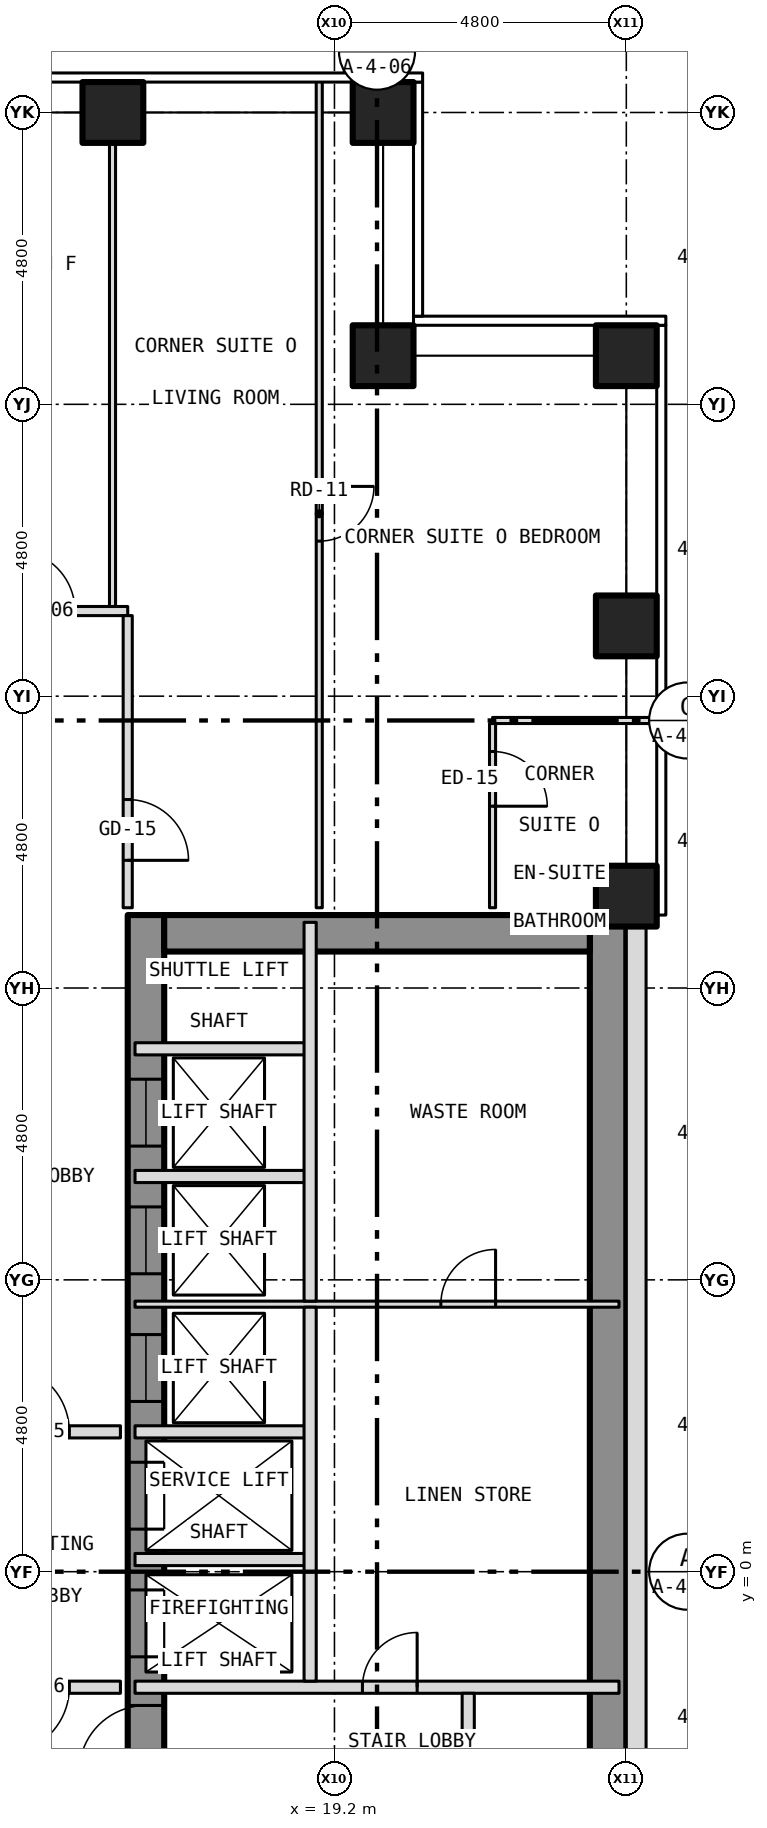
"""IFC4 building model, lengths in metres.
Left out: names, types, materials, properties, quantities, classifications, styles, units other than length and angle.
Written with IfcOpenShell. Run it as: python <this file> out.ifc"""

import sys

from ifc_helpers import new_model, si_unit, direction, frame, frame_2d, origin, origin_2d, place, context, subcontext, project, spatial, rectangle, hollow_rectangle, extrude, element, fill, save


model = new_model("IFC4")
c1 = context("Model", 3, precision=1e-05, world=origin(), true_north=direction((0.0, 1.0)))
c2 = subcontext(c1, "Body", "Model", "MODEL_VIEW")
j1 = project(units=[si_unit("LENGTHUNIT", "METRE"), si_unit("PLANEANGLEUNIT", "RADIAN")], contexts=[c1])
p1 = place(None, origin())
s1 = spatial("IfcSite", under=j1, at=p1, CompositionType="ELEMENT")
p2 = place(p1, origin())
s2 = spatial("IfcBuilding", under=s1, at=p2, CompositionType="ELEMENT")
p3 = place(p2, frame((0.0, 0.0, 49.5)))
s3 = spatial("IfcBuildingStorey", under=s2, at=p3, CompositionType="ELEMENT", Elevation=49.5)
for number, where, z_axis, x_axis in (
    (1, (15.556, 24.0, -0.15), (0.0, 0.0, 1.0), (1.0, 0.0, 0.0)),
    (2, (20.0, 24.0, -0.15), (0.0, 0.0, 1.0), (1.0, 0.0, 0.0)),
    (3, (24.0, 11.111, -0.15), (0.0, 0.0, 1.0), (1.0, 0.0, 0.0)),
    (4, (24.0, 15.556, -0.15), (0.0, 0.0, 1.0), (1.0, 0.0, 0.0)),
    (5, (24.0, 20.0, -0.15), (0.0, 0.0, 1.0), (1.0, 0.0, 0.0)),
    (6, (20.0, 20.0, -0.15), (0.0, 0.0, 1.0), (1.0, 0.0, 0.0)),
):
    element("IfcColumn", number, at=place(p3, frame(where, z_axis=z_axis, x_axis=x_axis)), inside=s3, PredefinedType="COLUMN", context=c2, shape_type="SweptSolid", body=[
        extrude(hollow_rectangle(XDim=1.0, YDim=1.0, WallThickness=0.06, at=origin_2d()), origin(), (0.0, 0.0, 1.0), 3.5),
    ])
p4 = place(p3, frame((16.1, -10.8, 0.0), z_axis=(0.0, 0.0, 1.0), x_axis=(0.0, 1.0, 0.0)))
e7 = element("IfcWall", 7, at=p4, inside=s3, PredefinedType="SHEAR", context=c2, shape_type="SweptSolid", body=[
    extrude(rectangle(XDim=21.6, YDim=0.6, at=frame_2d((10.8, 0.0))), origin(), (0.0, 0.0, 1.0), 3.25),
])
p5 = place(p4, frame((9.4, 0.0, 0.0)))
e8 = element("IfcOpeningElement", 8, at=p5, cuts=e7, PredefinedType="OPENING", context=c2, shape_type="SweptSolid", body=[
    extrude(rectangle(XDim=1.1, YDim=2.1, at=frame_2d((0.55, 1.05))), frame((0.0, 0.312, 0.0), z_axis=(0.0, -1.0, 0.0), x_axis=(1.0, 0.0, 0.0)), (0.0, 0.0, 1.0), 0.624),
])
p6 = place(p4, frame((11.5, 0.0, 0.0)))
e9 = element("IfcOpeningElement", 9, at=p6, cuts=e7, PredefinedType="OPENING", context=c2, shape_type="SweptSolid", body=[
    extrude(rectangle(XDim=1.1, YDim=2.1, at=frame_2d((0.55, 1.05))), frame((0.0, 0.312, 0.0), z_axis=(0.0, -1.0, 0.0), x_axis=(1.0, 0.0, 0.0)), (0.0, 0.0, 1.0), 0.624),
])
p7 = place(p4, frame((13.6, 0.0, 0.0)))
e10 = element("IfcOpeningElement", 10, at=p7, cuts=e7, PredefinedType="OPENING", context=c2, shape_type="SweptSolid", body=[
    extrude(rectangle(XDim=1.1, YDim=2.1, at=frame_2d((0.55, 1.05))), frame((0.0, 0.312, 0.0), z_axis=(0.0, -1.0, 0.0), x_axis=(1.0, 0.0, 0.0)), (0.0, 0.0, 1.0), 0.624),
])
p8 = place(p4, frame((15.7, 0.0, 0.0)))
e11 = element("IfcOpeningElement", 11, at=p8, cuts=e7, PredefinedType="OPENING", context=c2, shape_type="SweptSolid", body=[
    extrude(rectangle(XDim=1.1, YDim=2.1, at=frame_2d((0.55, 1.05))), frame((0.0, 0.312, 0.0), z_axis=(0.0, -1.0, 0.0), x_axis=(1.0, 0.0, 0.0)), (0.0, 0.0, 1.0), 0.624),
])
p9 = place(p4, frame((17.8, 0.0, 0.0)))
e12 = element("IfcOpeningElement", 12, at=p9, cuts=e7, PredefinedType="OPENING", context=c2, shape_type="SweptSolid", body=[
    extrude(rectangle(XDim=1.1, YDim=2.1, at=frame_2d((0.55, 1.05))), frame((0.0, 0.312, 0.0), z_axis=(0.0, -1.0, 0.0), x_axis=(1.0, 0.0, 0.0)), (0.0, 0.0, 1.0), 0.624),
])
p10 = place(p4, frame((5.642, 0.0, 0.0)))
e13 = element("IfcOpeningElement", 13, at=p10, cuts=e7, PredefinedType="OPENING", context=c2, shape_type="SweptSolid", body=[
    extrude(rectangle(XDim=1.1, YDim=2.1, at=frame_2d((0.55, 1.05))), frame((0.0, 0.312, 0.0), z_axis=(0.0, -1.0, 0.0), x_axis=(1.0, 0.0, 0.0)), (0.0, 0.0, 1.0), 0.624),
])
p11 = place(p4, frame((7.5, 0.0, 0.0)))
e14 = element("IfcOpeningElement", 14, at=p11, cuts=e7, PredefinedType="OPENING", context=c2, shape_type="SweptSolid", body=[
    extrude(rectangle(XDim=1.1, YDim=2.1, at=frame_2d((0.55, 1.05))), frame((0.0, 0.312, 0.0), z_axis=(0.0, -1.0, 0.0), x_axis=(1.0, 0.0, 0.0)), (0.0, 0.0, 1.0), 0.624),
])
p12 = place(p3, frame((23.7, -10.8, 0.0), z_axis=(0.0, 0.0, 1.0), x_axis=(0.0, 1.0, 0.0)))
e15 = element("IfcWall", 15, at=p12, inside=s3, PredefinedType="SHEAR", context=c2, shape_type="SweptSolid", body=[
    extrude(rectangle(XDim=21.6, YDim=0.6, at=frame_2d((10.8, 0.0))), origin(), (0.0, 0.0, 1.0), 3.25),
])
p13 = place(p3, frame((16.4, 10.5, 0.0), z_axis=(0.0, 0.0, 1.0), x_axis=(1.0, 0.0, 0.0)))
e16 = element("IfcWall", 16, at=p13, inside=s3, PredefinedType="SHEAR", context=c2, shape_type="SweptSolid", body=[
    extrude(rectangle(XDim=7.0, YDim=0.6, at=frame_2d((3.5, 0.0))), origin(), (0.0, 0.0, 1.0), 3.25),
])
p14 = place(p3, frame((24.163, -10.8, 0.0), z_axis=(0.0, 0.0, 1.0), x_axis=(0.0, 1.0, 0.0)))
e17 = element("IfcWall", 17, at=p14, inside=s3, PredefinedType="SOLIDWALL", context=c2, shape_type="SweptSolid", body=[
    extrude(rectangle(XDim=21.6, YDim=0.325, at=frame_2d((10.8, 0.0))), origin(), (0.0, 0.0, 1.0), 3.5),
])
p15 = place(p14, frame((2.95, 0.0, 1.0)))
e18 = element("IfcOpeningElement", 18, at=p15, cuts=e17, PredefinedType="OPENING", context=c2, shape_type="SweptSolid", body=[
    extrude(rectangle(XDim=0.6, YDim=1.5, at=frame_2d((0.3, 0.75))), frame((0.0, 0.175, 0.0), z_axis=(0.0, -1.0, 0.0), x_axis=(1.0, 0.0, 0.0)), (0.0, 0.0, 1.0), 0.349),
])
p16 = place(p3, frame((12.4, -1.9, 0.0), z_axis=(0.0, 0.0, 1.0), x_axis=(1.0, 0.0, 0.0)))
e19 = element("IfcWall", 19, at=p16, inside=s3, PredefinedType="PARTITIONING", context=c2, shape_type="SweptSolid", body=[
    extrude(rectangle(XDim=3.28, YDim=0.2, at=frame_2d((1.64, 0.0))), origin(), (0.0, 0.0, 1.0), 3.35),
])
p17 = place(p16, frame((1.34, 0.0, 0.0)))
e20 = element("IfcOpeningElement", 20, at=p17, cuts=e19, PredefinedType="OPENING", context=c2, shape_type="SweptSolid", body=[
    extrude(rectangle(XDim=1.1, YDim=2.1, at=frame_2d((0.55, 1.05))), frame((0.0, 0.112, 0.0), z_axis=(0.0, -1.0, 0.0), x_axis=(1.0, 0.0, 0.0)), (0.0, 0.0, 1.0), 0.224),
])
p18 = place(p3, frame((15.92, -1.9, 0.0), z_axis=(0.0, 0.0, 1.0), x_axis=(1.0, 0.0, 0.0)))
e21 = element("IfcWall", 21, at=p18, inside=s3, PredefinedType="PARTITIONING", context=c2, shape_type="SweptSolid", body=[
    extrude(rectangle(XDim=7.96, YDim=0.2, at=frame_2d((3.98, 0.0))), origin(), (0.0, 0.0, 1.0), 3.25),
])
p19 = place(p18, frame((3.74, 0.0, 0.0)))
e22 = element("IfcOpeningElement", 22, at=p19, cuts=e21, PredefinedType="OPENING", context=c2, shape_type="SweptSolid", body=[
    extrude(rectangle(XDim=0.9, YDim=2.1, at=frame_2d((0.45, 1.05))), frame((0.0, 0.112, 0.0), z_axis=(0.0, -1.0, 0.0), x_axis=(1.0, 0.0, 0.0)), (0.0, 0.0, 1.0), 0.224),
])
p20 = place(p3, frame((15.92, 0.2, 0.0), z_axis=(0.0, 0.0, 1.0), x_axis=(1.0, 0.0, 0.0)))
e23 = element("IfcWall", 23, at=p20, inside=s3, PredefinedType="PARTITIONING", context=c2, shape_type="SweptSolid", body=[
    extrude(rectangle(XDim=2.88, YDim=0.2, at=frame_2d((1.44, 0.0))), origin(), (0.0, 0.0, 1.0), 3.25),
])
p21 = place(p3, frame((12.4, 2.3, 0.0), z_axis=(0.0, 0.0, 1.0), x_axis=(1.0, 0.0, 0.0)))
e24 = element("IfcWall", 24, at=p21, inside=s3, PredefinedType="PARTITIONING", context=c2, shape_type="SweptSolid", body=[
    extrude(rectangle(XDim=3.28, YDim=0.2, at=frame_2d((1.64, 0.0))), origin(), (0.0, 0.0, 1.0), 3.35),
])
p22 = place(p21, frame((1.34, 0.0, 0.0)))
e25 = element("IfcOpeningElement", 25, at=p22, cuts=e24, PredefinedType="OPENING", context=c2, shape_type="SweptSolid", body=[
    extrude(rectangle(XDim=1.1, YDim=2.1, at=frame_2d((0.55, 1.05))), frame((0.0, 0.112, 0.0), z_axis=(0.0, -1.0, 0.0), x_axis=(1.0, 0.0, 0.0)), (0.0, 0.0, 1.0), 0.224),
])
p23 = place(p3, frame((15.92, 2.3, 0.0), z_axis=(0.0, 0.0, 1.0), x_axis=(1.0, 0.0, 0.0)))
e26 = element("IfcWall", 26, at=p23, inside=s3, PredefinedType="PARTITIONING", context=c2, shape_type="SweptSolid", body=[
    extrude(rectangle(XDim=2.88, YDim=0.2, at=frame_2d((1.44, 0.0))), origin(), (0.0, 0.0, 1.0), 3.25),
])
p24 = place(p3, frame((15.92, 4.4, 0.0), z_axis=(0.0, 0.0, 1.0), x_axis=(1.0, 0.0, 0.0)))
e27 = element("IfcWall", 27, at=p24, inside=s3, PredefinedType="PARTITIONING", context=c2, shape_type="SweptSolid", body=[
    extrude(rectangle(XDim=7.96, YDim=0.1, at=frame_2d((3.98, 0.0))), origin(), (0.0, 0.0, 1.0), 3.25),
])
p25 = place(p24, frame((5.03, 0.0, 0.0)))
e28 = element("IfcOpeningElement", 28, at=p25, cuts=e27, PredefinedType="OPENING", context=c2, shape_type="SweptSolid", body=[
    extrude(rectangle(XDim=0.9, YDim=2.1, at=frame_2d((0.45, 1.05))), frame((0.0, 0.062, 0.0), z_axis=(0.0, -1.0, 0.0), x_axis=(1.0, 0.0, 0.0)), (0.0, 0.0, 1.0), 0.124),
])
for number, where, z_axis, x_axis in (
    (29, (15.92, 6.5, 0.0), (0.0, 0.0, 1.0), (1.0, 0.0, 0.0)),
    (30, (15.92, 8.6, 0.0), (0.0, 0.0, 1.0), (1.0, 0.0, 0.0)),
):
    element("IfcWall", number, at=place(p3, frame(where, z_axis=z_axis, x_axis=x_axis)), inside=s3, PredefinedType="PARTITIONING", context=c2, shape_type="SweptSolid", body=[
        extrude(rectangle(XDim=2.88, YDim=0.2, at=frame_2d((1.44, 0.0))), origin(), (0.0, 0.0, 1.0), 3.25),
    ])
p26 = place(p3, frame((21.8, 14.0, 0.0), z_axis=(0.0, 0.0, 1.0), x_axis=(1.0, 0.0, 0.0)))
e31 = element("IfcWall", 31, at=p26, inside=s3, PredefinedType="PARTITIONING", context=c2, shape_type="SweptSolid", body=[
    extrude(rectangle(XDim=2.73, YDim=0.1, at=frame_2d((1.365, 0.0))), origin(), (0.0, 0.0, 1.0), 3.35),
])
p27 = place(p3, frame((-15.8, 15.8, 0.0), z_axis=(0.0, 0.0, 1.0), x_axis=(1.0, 0.0, 0.0)))
e32 = element("IfcWall", 32, at=p27, inside=s3, PredefinedType="PARTITIONING", context=c2, shape_type="SweptSolid", body=[
    extrude(rectangle(XDim=31.6, YDim=0.15, at=frame_2d((15.8, 0.0))), origin(), (0.0, 0.0, 1.0), 3.35),
])
p28 = place(p27, frame((4.178, 0.0, 0.0)))
e33 = element("IfcOpeningElement", 33, at=p28, cuts=e32, PredefinedType="OPENING", context=c2, shape_type="SweptSolid", body=[
    extrude(rectangle(XDim=1.0, YDim=2.1, at=frame_2d((0.5, 1.05))), frame((0.0, 0.087, 0.0), z_axis=(0.0, -1.0, 0.0), x_axis=(1.0, 0.0, 0.0)), (0.0, 0.0, 1.0), 0.174),
])
p29 = place(p27, frame((9.734, 0.0, 0.0)))
e34 = element("IfcOpeningElement", 34, at=p29, cuts=e32, PredefinedType="OPENING", context=c2, shape_type="SweptSolid", body=[
    extrude(rectangle(XDim=1.0, YDim=2.1, at=frame_2d((0.5, 1.05))), frame((0.0, 0.087, 0.0), z_axis=(0.0, -1.0, 0.0), x_axis=(1.0, 0.0, 0.0)), (0.0, 0.0, 1.0), 0.174),
])
p30 = place(p27, frame((14.178, 0.0, 0.0)))
e35 = element("IfcOpeningElement", 35, at=p30, cuts=e32, PredefinedType="OPENING", context=c2, shape_type="SweptSolid", body=[
    extrude(rectangle(XDim=1.0, YDim=2.1, at=frame_2d((0.5, 1.05))), frame((0.0, 0.087, 0.0), z_axis=(0.0, -1.0, 0.0), x_axis=(1.0, 0.0, 0.0)), (0.0, 0.0, 1.0), 0.174),
])
p31 = place(p27, frame((17.534, 0.0, 0.0)))
e36 = element("IfcOpeningElement", 36, at=p31, cuts=e32, PredefinedType="OPENING", context=c2, shape_type="SweptSolid", body=[
    extrude(rectangle(XDim=1.0, YDim=2.1, at=frame_2d((0.5, 1.05))), frame((0.0, 0.087, 0.0), z_axis=(0.0, -1.0, 0.0), x_axis=(1.0, 0.0, 0.0)), (0.0, 0.0, 1.0), 0.174),
])
p32 = place(p27, frame((25.289, 0.0, 0.0)))
e37 = element("IfcOpeningElement", 37, at=p32, cuts=e32, PredefinedType="OPENING", context=c2, shape_type="SweptSolid", body=[
    extrude(rectangle(XDim=1.0, YDim=2.1, at=frame_2d((0.5, 1.05))), frame((0.0, 0.087, 0.0), z_axis=(0.0, -1.0, 0.0), x_axis=(1.0, 0.0, 0.0)), (0.0, 0.0, 1.0), 0.174),
])
p33 = place(p27, frame((29.733, 0.0, 0.0)))
e38 = element("IfcOpeningElement", 38, at=p33, cuts=e32, PredefinedType="OPENING", context=c2, shape_type="SweptSolid", body=[
    extrude(rectangle(XDim=1.0, YDim=2.1, at=frame_2d((0.5, 1.05))), frame((0.0, 0.087, 0.0), z_axis=(0.0, -1.0, 0.0), x_axis=(1.0, 0.0, 0.0)), (0.0, 0.0, 1.0), 0.174),
])
p34 = place(p3, frame((15.55, 15.875, 0.0), z_axis=(0.0, 0.0, 1.0), x_axis=(0.0, 1.0, 0.0)))
e39 = element("IfcWall", 39, at=p34, inside=s3, PredefinedType="PARTITIONING", context=c2, shape_type="SweptSolid", body=[
    extrude(rectangle(XDim=8.005, YDim=0.1, at=frame_2d((4.002, 0.0))), origin(), (0.0, 0.0, 1.0), 3.35),
])
p35 = place(p3, frame((15.8, 10.92, 0.0), z_axis=(0.0, 0.0, 1.0), x_axis=(0.0, 1.0, 0.0)))
e40 = element("IfcWall", 40, at=p35, inside=s3, PredefinedType="PARTITIONING", context=c2, shape_type="SweptSolid", body=[
    extrude(rectangle(XDim=4.805, YDim=0.15, at=frame_2d((2.403, 0.0))), origin(), (0.0, 0.0, 1.0), 3.35),
])
p36 = place(p35, frame((0.78, 0.0, 0.0)))
e41 = element("IfcOpeningElement", 41, at=p36, cuts=e40, PredefinedType="OPENING", context=c2, shape_type="SweptSolid", body=[
    extrude(rectangle(XDim=1.0, YDim=2.1, at=frame_2d((0.5, 1.05))), frame((0.0, 0.087, 0.0), z_axis=(0.0, -1.0, 0.0), x_axis=(1.0, 0.0, 0.0)), (0.0, 0.0, 1.0), 0.174),
])
p37 = place(p3, frame((18.8, -1.8, 0.0), z_axis=(0.0, 0.0, 1.0), x_axis=(0.0, 1.0, 0.0)))
e42 = element("IfcWall", 42, at=p37, inside=s3, PredefinedType="PARTITIONING", context=c2, shape_type="SweptSolid", body=[
    extrude(rectangle(XDim=6.15, YDim=0.2, at=frame_2d((3.075, 0.0))), origin(), (0.0, 0.0, 1.0), 3.25),
])
p38 = place(p3, frame((18.8, 4.45, 0.0), z_axis=(0.0, 0.0, 1.0), x_axis=(0.0, 1.0, 0.0)))
e43 = element("IfcWall", 43, at=p38, inside=s3, PredefinedType="PARTITIONING", context=c2, shape_type="SweptSolid", body=[
    extrude(rectangle(XDim=6.23, YDim=0.2, at=frame_2d((3.115, 0.0))), origin(), (0.0, 0.0, 1.0), 3.25),
])
p39 = place(p3, frame((18.95, 10.92, 0.0), z_axis=(0.0, 0.0, 1.0), x_axis=(0.0, 1.0, 0.0)))
e44 = element("IfcWall", 44, at=p39, inside=s3, PredefinedType="PARTITIONING", context=c2, shape_type="SweptSolid", body=[
    extrude(rectangle(XDim=13.61, YDim=0.1, at=frame_2d((6.805, 0.0))), origin(), (0.0, 0.0, 1.0), 3.35),
])
p40 = place(p39, frame((6.03, 0.0, 0.0)))
e45 = element("IfcOpeningElement", 45, at=p40, cuts=e44, PredefinedType="OPENING", context=c2, shape_type="SweptSolid", body=[
    extrude(rectangle(XDim=0.9, YDim=2.1, at=frame_2d((0.45, 1.05))), frame((0.0, 0.062, 0.0), z_axis=(0.0, -1.0, 0.0), x_axis=(1.0, 0.0, 0.0)), (0.0, 0.0, 1.0), 0.124),
])
p41 = place(p3, frame((21.4, -10.68, 0.0), z_axis=(0.0, 0.0, 1.0), x_axis=(0.0, 1.0, 0.0)))
e46 = element("IfcWall", 46, at=p41, inside=s3, PredefinedType="PARTITIONING", context=c2, shape_type="SweptSolid", body=[
    extrude(rectangle(XDim=8.68, YDim=0.2, at=frame_2d((4.34, 0.0))), origin(), (0.0, 0.0, 1.0), 3.25),
])
p42 = place(p41, frame((3.88, 0.0, 0.0)))
e47 = element("IfcOpeningElement", 47, at=p42, cuts=e46, PredefinedType="OPENING", context=c2, shape_type="SweptSolid", body=[
    extrude(rectangle(XDim=0.9, YDim=2.1, at=frame_2d((0.45, 1.05))), frame((0.0, 0.112, 0.0), z_axis=(0.0, -1.0, 0.0), x_axis=(1.0, 0.0, 0.0)), (0.0, 0.0, 1.0), 0.224),
])
p43 = place(p3, frame((21.8, 10.92, 0.0), z_axis=(0.0, 0.0, 1.0), x_axis=(0.0, 1.0, 0.0)))
e48 = element("IfcWall", 48, at=p43, inside=s3, PredefinedType="PARTITIONING", context=c2, shape_type="SweptSolid", body=[
    extrude(rectangle(XDim=3.03, YDim=0.1, at=frame_2d((1.515, 0.0))), origin(), (0.0, 0.0, 1.0), 3.35),
])
p44 = place(p43, frame((1.67, 0.0, 0.0)))
e49 = element("IfcOpeningElement", 49, at=p44, cuts=e48, PredefinedType="OPENING", context=c2, shape_type="SweptSolid", body=[
    extrude(rectangle(XDim=0.9, YDim=2.1, at=frame_2d((0.45, 1.05))), frame((0.0, 0.062, 0.0), z_axis=(0.0, -1.0, 0.0), x_axis=(1.0, 0.0, 0.0)), (0.0, 0.0, 1.0), 0.124),
])
p45 = place(p5, origin())
e50 = element("IfcDoor", 50, at=p45, inside=s3, OperationType="SLIDING_TO_LEFT", PredefinedType="DOOR", context=c2, shape_type="SweptSolid", body=[
    extrude(rectangle(XDim=1.1, YDim=2.1, at=frame_2d((0.55, 1.05))), frame((0.0, 0.025, 0.0), z_axis=(0.0, -1.0, 0.0), x_axis=(1.0, 0.0, 0.0)), (0.0, 0.0, 1.0), 0.05),
])
fill(e8, e50)
p46 = place(p6, origin())
e51 = element("IfcDoor", 51, at=p46, inside=s3, OperationType="SLIDING_TO_LEFT", PredefinedType="DOOR", context=c2, shape_type="SweptSolid", body=[
    extrude(rectangle(XDim=1.1, YDim=2.1, at=frame_2d((0.55, 1.05))), frame((0.0, 0.025, 0.0), z_axis=(0.0, -1.0, 0.0), x_axis=(1.0, 0.0, 0.0)), (0.0, 0.0, 1.0), 0.05),
])
fill(e9, e51)
p47 = place(p7, origin())
e52 = element("IfcDoor", 52, at=p47, inside=s3, OperationType="SLIDING_TO_LEFT", PredefinedType="DOOR", context=c2, shape_type="SweptSolid", body=[
    extrude(rectangle(XDim=1.1, YDim=2.1, at=frame_2d((0.55, 1.05))), frame((0.0, 0.025, 0.0), z_axis=(0.0, -1.0, 0.0), x_axis=(1.0, 0.0, 0.0)), (0.0, 0.0, 1.0), 0.05),
])
fill(e10, e52)
p48 = place(p8, origin())
e53 = element("IfcDoor", 53, at=p48, inside=s3, OperationType="SLIDING_TO_LEFT", PredefinedType="DOOR", context=c2, shape_type="SweptSolid", body=[
    extrude(rectangle(XDim=1.1, YDim=2.1, at=frame_2d((0.55, 1.05))), frame((0.0, 0.025, 0.0), z_axis=(0.0, -1.0, 0.0), x_axis=(1.0, 0.0, 0.0)), (0.0, 0.0, 1.0), 0.05),
])
fill(e11, e53)
p49 = place(p9, origin())
e54 = element("IfcDoor", 54, at=p49, inside=s3, OperationType="SLIDING_TO_LEFT", PredefinedType="DOOR", context=c2, shape_type="SweptSolid", body=[
    extrude(rectangle(XDim=1.1, YDim=2.1, at=frame_2d((0.55, 1.05))), frame((0.0, 0.025, 0.0), z_axis=(0.0, -1.0, 0.0), x_axis=(1.0, 0.0, 0.0)), (0.0, 0.0, 1.0), 0.05),
])
fill(e12, e54)
p50 = place(p11, origin())
e55 = element("IfcDoor", 55, at=p50, inside=s3, OperationType="SINGLE_SWING_LEFT", PredefinedType="DOOR", context=c2, shape_type="SweptSolid", body=[
    extrude(rectangle(XDim=1.1, YDim=2.1, at=frame_2d((0.55, 1.05))), frame((0.0, 0.025, 0.0), z_axis=(0.0, -1.0, 0.0), x_axis=(1.0, 0.0, 0.0)), (0.0, 0.0, 1.0), 0.05),
])
fill(e14, e55)
p51 = place(p19, origin())
e56 = element("IfcDoor", 56, at=p51, inside=s3, OperationType="SINGLE_SWING_RIGHT", PredefinedType="DOOR", context=c2, shape_type="SweptSolid", body=[
    extrude(rectangle(XDim=0.9, YDim=2.1, at=frame_2d((0.45, 1.05))), frame((0.0, 0.025, 0.0), z_axis=(0.0, -1.0, 0.0), x_axis=(1.0, 0.0, 0.0)), (0.0, 0.0, 1.0), 0.05),
])
fill(e22, e56)
p52 = place(p25, origin())
e57 = element("IfcDoor", 57, at=p52, inside=s3, OperationType="SINGLE_SWING_RIGHT", PredefinedType="DOOR", context=c2, shape_type="SweptSolid", body=[
    extrude(rectangle(XDim=0.9, YDim=2.1, at=frame_2d((0.45, 1.05))), frame((0.0, 0.025, 0.0), z_axis=(0.0, -1.0, 0.0), x_axis=(1.0, 0.0, 0.0)), (0.0, 0.0, 1.0), 0.05),
])
fill(e28, e57)
p53 = place(p22, origin())
e58 = element("IfcDoor", 58, at=p53, inside=s3, OperationType="SINGLE_SWING_LEFT", PredefinedType="DOOR", context=c2, shape_type="SweptSolid", body=[
    extrude(rectangle(XDim=1.1, YDim=2.1, at=frame_2d((0.55, 1.05))), frame((0.0, 0.025, 0.0), z_axis=(0.0, -1.0, 0.0), x_axis=(1.0, 0.0, 0.0)), (0.0, 0.0, 1.0), 0.05),
])
fill(e25, e58)
p54 = place(p17, origin())
e59 = element("IfcDoor", 59, at=p54, inside=s3, OperationType="SINGLE_SWING_LEFT", PredefinedType="DOOR", context=c2, shape_type="SweptSolid", body=[
    extrude(rectangle(XDim=1.1, YDim=2.1, at=frame_2d((0.55, 1.05))), frame((0.0, 0.025, 0.0), z_axis=(0.0, -1.0, 0.0), x_axis=(1.0, 0.0, 0.0)), (0.0, 0.0, 1.0), 0.05),
])
fill(e20, e59)
p55 = place(p33, origin())
e60 = element("IfcDoor", 60, at=p55, inside=s3, OperationType="SINGLE_SWING_LEFT", PredefinedType="DOOR", context=c2, shape_type="SweptSolid", body=[
    extrude(rectangle(XDim=1.0, YDim=2.1, at=frame_2d((0.5, 1.05))), frame((0.0, 0.025, 0.0), z_axis=(0.0, -1.0, 0.0), x_axis=(1.0, 0.0, 0.0)), (0.0, 0.0, 1.0), 0.05),
])
fill(e38, e60)
p56 = place(p36, origin())
e61 = element("IfcDoor", 61, at=p56, inside=s3, OperationType="SINGLE_SWING_LEFT", PredefinedType="DOOR", context=c2, shape_type="SweptSolid", body=[
    extrude(rectangle(XDim=1.0, YDim=2.1, at=frame_2d((0.5, 1.05))), frame((0.0, 0.025, 0.0), z_axis=(0.0, -1.0, 0.0), x_axis=(1.0, 0.0, 0.0)), (0.0, 0.0, 1.0), 0.05),
])
fill(e41, e61)
p57 = place(p40, origin())
e62 = element("IfcDoor", 62, at=p57, inside=s3, OperationType="SINGLE_SWING_RIGHT", PredefinedType="DOOR", context=c2, shape_type="SweptSolid", body=[
    extrude(rectangle(XDim=0.9, YDim=2.1, at=frame_2d((0.45, 1.05))), frame((0.0, 0.025, 0.0), z_axis=(0.0, -1.0, 0.0), x_axis=(1.0, 0.0, 0.0)), (0.0, 0.0, 1.0), 0.05),
])
fill(e45, e62)
p58 = place(p44, origin())
e63 = element("IfcDoor", 63, at=p58, inside=s3, OperationType="SINGLE_SWING_LEFT", PredefinedType="DOOR", context=c2, shape_type="SweptSolid", body=[
    extrude(rectangle(XDim=0.9, YDim=2.1, at=frame_2d((0.45, 1.05))), frame((0.0, 0.025, 0.0), z_axis=(0.0, -1.0, 0.0), x_axis=(1.0, 0.0, 0.0)), (0.0, 0.0, 1.0), 0.05),
])
fill(e49, e63)
save(model, sys.argv[1])
